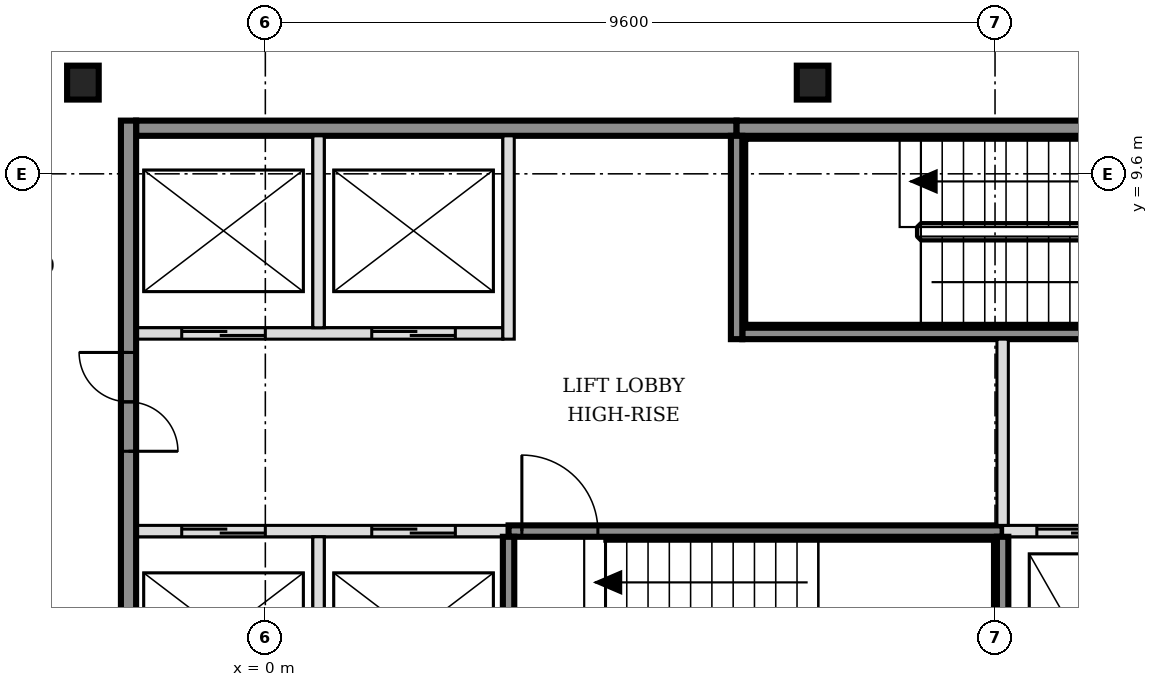
"""IFC4 building model, lengths in metres.
Left out: names, types, materials, properties, quantities, classifications, styles, units other than length and angle.
Written with IfcOpenShell. Run it as: python <this file> out.ifc"""

import sys

from ifc_helpers import new_model, si_unit, direction, frame, frame_2d, origin, origin_2d, place, context, subcontext, project, spatial, rectangle, i_section, extrude, element, fill, save


model = new_model("IFC4")
c1 = context("Model", 3, precision=1e-05, world=origin(), true_north=direction((0.0, 1.0)))
c2 = subcontext(c1, "Body", "Model", "MODEL_VIEW")
j1 = project(units=[si_unit("LENGTHUNIT", "METRE"), si_unit("PLANEANGLEUNIT", "RADIAN")], contexts=[c1])
p1 = place(None, origin())
s1 = spatial("IfcSite", under=j1, at=p1, CompositionType="ELEMENT")
p2 = place(p1, origin())
s2 = spatial("IfcBuilding", under=s1, at=p2, CompositionType="ELEMENT")
p3 = place(p2, frame((0.0, 0.0, 157.8)))
s3 = spatial("IfcBuildingStorey", under=s2, at=p3, CompositionType="ELEMENT", Elevation=157.8)
for number, where, z_axis, x_axis in (
    (1, (-2.4, 10.8, -0.15), (0.0, 0.0, 1.0), (1.0, 0.0, 0.0)),
    (2, (7.2, 10.8, -0.15), (0.0, 0.0, 1.0), (1.0, 0.0, 0.0)),
):
    element("IfcColumn", number, at=place(p3, frame(where, z_axis=z_axis, x_axis=x_axis)), inside=s3, PredefinedType="COLUMN", context=c2, shape_type="SweptSolid", body=[
        extrude(i_section(OverallWidth=0.416, OverallDepth=0.446, WebThickness=0.039, FlangeThickness=0.063, FilletRadius=0.015, at=origin_2d()), origin(), (0.0, 0.0, 1.0), 3.6),
    ])
p4 = place(p3, frame((-1.7, 4.9, 0.0), z_axis=(0.0, 0.0, 1.0), x_axis=(1.0, 0.0, 0.0)))
e3 = element("IfcWall", 3, at=p4, inside=s3, PredefinedType="SOLIDWALL", context=c2, shape_type="SweptSolid", body=[
    extrude(rectangle(XDim=4.9, YDim=0.15, at=frame_2d((2.45, 0.0))), origin(), (0.0, 0.0, 1.0), 3.45),
])
p5 = place(p4, frame((0.6, 0.0, 0.0)))
e4 = element("IfcOpeningElement", 4, at=p5, cuts=e3, PredefinedType="OPENING", context=c2, shape_type="SweptSolid", body=[
    extrude(rectangle(XDim=1.1, YDim=2.1, at=frame_2d((0.55, 1.05))), frame((0.0, 0.085, 0.0), z_axis=(0.0, -1.0, 0.0), x_axis=(1.0, 0.0, 0.0)), (0.0, 0.0, 1.0), 0.17),
])
p6 = place(p4, frame((3.1, 0.0, 0.0)))
e5 = element("IfcOpeningElement", 5, at=p6, cuts=e3, PredefinedType="OPENING", context=c2, shape_type="SweptSolid", body=[
    extrude(rectangle(XDim=1.1, YDim=2.1, at=frame_2d((0.55, 1.05))), frame((0.0, 0.085, 0.0), z_axis=(0.0, -1.0, 0.0), x_axis=(1.0, 0.0, 0.0)), (0.0, 0.0, 1.0), 0.17),
])
p7 = place(p3, frame((3.2, 4.9, 0.0), z_axis=(0.0, 0.0, 1.0), x_axis=(1.0, 0.0, 0.0)))
e6 = element("IfcWall", 6, at=p7, inside=s3, PredefinedType="SOLIDWALL", context=c2, shape_type="SweptSolid", body=[
    extrude(rectangle(XDim=6.5, YDim=0.15, at=frame_2d((3.25, 0.0))), origin(), (0.0, 0.0, 1.0), 3.45),
])
p8 = place(p7, frame((0.175, 0.0, 0.0)))
e7 = element("IfcOpeningElement", 7, at=p8, cuts=e6, PredefinedType="OPENING", context=c2, shape_type="SweptSolid", body=[
    extrude(rectangle(XDim=1.0, YDim=2.1, at=frame_2d((0.5, 1.05))), frame((0.0, 0.085, 0.0), z_axis=(0.0, -1.0, 0.0), x_axis=(1.0, 0.0, 0.0)), (0.0, 0.0, 1.0), 0.17),
])
p9 = place(p3, frame((9.7, 4.9, 0.0), z_axis=(0.0, 0.0, 1.0), x_axis=(1.0, 0.0, 0.0)))
e8 = element("IfcWall", 8, at=p9, inside=s3, PredefinedType="SOLIDWALL", context=c2, shape_type="SweptSolid", body=[
    extrude(rectangle(XDim=6.4, YDim=0.15, at=frame_2d((3.2, 0.0))), origin(), (0.0, 0.0, 1.0), 3.45),
])
p10 = place(p9, frame((0.45, 0.0, 0.0)))
e9 = element("IfcOpeningElement", 9, at=p10, cuts=e8, PredefinedType="OPENING", context=c2, shape_type="SweptSolid", body=[
    extrude(rectangle(XDim=1.0, YDim=2.1, at=frame_2d((0.5, 1.05))), frame((0.0, 0.085, 0.0), z_axis=(0.0, -1.0, 0.0), x_axis=(1.0, 0.0, 0.0)), (0.0, 0.0, 1.0), 0.17),
])
p11 = place(p9, frame((2.35, 0.0, 0.0)))
e10 = element("IfcOpeningElement", 10, at=p11, cuts=e8, PredefinedType="OPENING", context=c2, shape_type="SweptSolid", body=[
    extrude(rectangle(XDim=1.0, YDim=2.1, at=frame_2d((0.5, 1.05))), frame((0.0, 0.085, 0.0), z_axis=(0.0, -1.0, 0.0), x_axis=(1.0, 0.0, 0.0)), (0.0, 0.0, 1.0), 0.17),
])
p12 = place(p9, frame((4.7, 0.0, 0.0)))
e11 = element("IfcOpeningElement", 11, at=p12, cuts=e8, PredefinedType="OPENING", context=c2, shape_type="SweptSolid", body=[
    extrude(rectangle(XDim=0.9, YDim=2.1, at=frame_2d((0.45, 1.05))), frame((0.0, 0.085, 0.0), z_axis=(0.0, -1.0, 0.0), x_axis=(1.0, 0.0, 0.0)), (0.0, 0.0, 1.0), 0.17),
])
p13 = place(p3, frame((-1.7, 7.5, 0.0), z_axis=(0.0, 0.0, 1.0), x_axis=(1.0, 0.0, 0.0)))
e12 = element("IfcWall", 12, at=p13, inside=s3, PredefinedType="SOLIDWALL", context=c2, shape_type="SweptSolid", body=[
    extrude(rectangle(XDim=4.825, YDim=0.15, at=frame_2d((2.413, 0.0))), origin(), (0.0, 0.0, 1.0), 3.45),
])
p14 = place(p13, frame((0.6, 0.0, 0.0)))
e13 = element("IfcOpeningElement", 13, at=p14, cuts=e12, PredefinedType="OPENING", context=c2, shape_type="SweptSolid", body=[
    extrude(rectangle(XDim=1.1, YDim=2.1, at=frame_2d((0.55, 1.05))), frame((0.0, 0.085, 0.0), z_axis=(0.0, -1.0, 0.0), x_axis=(1.0, 0.0, 0.0)), (0.0, 0.0, 1.0), 0.17),
])
p15 = place(p13, frame((3.1, 0.0, 0.0)))
e14 = element("IfcOpeningElement", 14, at=p15, cuts=e12, PredefinedType="OPENING", context=c2, shape_type="SweptSolid", body=[
    extrude(rectangle(XDim=1.1, YDim=2.1, at=frame_2d((0.55, 1.05))), frame((0.0, 0.085, 0.0), z_axis=(0.0, -1.0, 0.0), x_axis=(1.0, 0.0, 0.0)), (0.0, 0.0, 1.0), 0.17),
])
p16 = place(p3, frame((6.275, 7.5, 0.0), z_axis=(0.0, 0.0, 1.0), x_axis=(1.0, 0.0, 0.0)))
e15 = element("IfcWall", 15, at=p16, inside=s3, PredefinedType="SOLIDWALL", context=c2, shape_type="SweptSolid", body=[
    extrude(rectangle(XDim=6.425, YDim=0.15, at=frame_2d((3.212, 0.0))), origin(), (0.0, 0.0, 1.0), 3.45),
])
p17 = place(p16, frame((5.225, 0.0, 0.0)))
e16 = element("IfcOpeningElement", 16, at=p17, cuts=e15, PredefinedType="OPENING", context=c2, shape_type="SweptSolid", body=[
    extrude(rectangle(XDim=1.0, YDim=2.1, at=frame_2d((0.5, 1.05))), frame((0.0, 0.085, 0.0), z_axis=(0.0, -1.0, 0.0), x_axis=(1.0, 0.0, 0.0)), (0.0, 0.0, 1.0), 0.17),
])
p18 = place(p3, frame((-1.7, 10.2, 0.0), z_axis=(0.0, 0.0, 1.0), x_axis=(1.0, 0.0, 0.0)))
e17 = element("IfcWall", 17, at=p18, inside=s3, PredefinedType="SOLIDWALL", context=c2, shape_type="SweptSolid", body=[
    extrude(rectangle(XDim=7.9, YDim=0.2, at=frame_2d((3.95, 0.0))), origin(), (0.0, 0.0, 1.0), 3.45),
])
p19 = place(p3, frame((6.2, 10.2, 0.0), z_axis=(0.0, 0.0, 1.0), x_axis=(1.0, 0.0, 0.0)))
e18 = element("IfcWall", 18, at=p19, inside=s3, PredefinedType="SOLIDWALL", context=c2, shape_type="SweptSolid", body=[
    extrude(rectangle(XDim=6.5, YDim=0.2, at=frame_2d((3.25, 0.0))), origin(), (0.0, 0.0, 1.0), 3.45),
])
p20 = place(p3, frame((-1.8, -5.5, 0.0), z_axis=(0.0, 0.0, 1.0), x_axis=(0.0, 1.0, 0.0)))
e19 = element("IfcWall", 19, at=p20, inside=s3, PredefinedType="SOLIDWALL", context=c2, shape_type="SweptSolid", body=[
    extrude(rectangle(XDim=15.8, YDim=0.2, at=frame_2d((7.9, 0.0))), origin(), (0.0, 0.0, 1.0), 3.45),
])
p21 = place(p20, frame((3.05, 0.0, 0.0)))
e20 = element("IfcOpeningElement", 20, at=p21, cuts=e19, PredefinedType="OPENING", context=c2, shape_type="SweptSolid", body=[
    extrude(rectangle(XDim=1.3, YDim=2.1, at=frame_2d((0.65, 1.05))), frame((0.0, 0.11, 0.0), z_axis=(0.0, -1.0, 0.0), x_axis=(1.0, 0.0, 0.0)), (0.0, 0.0, 1.0), 0.22),
])
p22 = place(p20, frame((11.45, 0.0, 0.0)))
e21 = element("IfcOpeningElement", 21, at=p22, cuts=e19, PredefinedType="OPENING", context=c2, shape_type="SweptSolid", body=[
    extrude(rectangle(XDim=1.3, YDim=2.1, at=frame_2d((0.65, 1.05))), frame((0.0, 0.11, 0.0), z_axis=(0.0, -1.0, 0.0), x_axis=(1.0, 0.0, 0.0)), (0.0, 0.0, 1.0), 0.22),
])
p23 = place(p3, frame((0.7, 2.275, 0.0), z_axis=(0.0, 0.0, 1.0), x_axis=(0.0, 1.0, 0.0)))
e22 = element("IfcWall", 22, at=p23, inside=s3, PredefinedType="SOLIDWALL", context=c2, shape_type="SweptSolid", body=[
    extrude(rectangle(XDim=2.55, YDim=0.15, at=frame_2d((1.275, 0.0))), origin(), (0.0, 0.0, 1.0), 3.45),
])
p24 = place(p3, frame((0.7, 7.575, 0.0), z_axis=(0.0, 0.0, 1.0), x_axis=(0.0, 1.0, 0.0)))
e23 = element("IfcWall", 23, at=p24, inside=s3, PredefinedType="SOLIDWALL", context=c2, shape_type="SweptSolid", body=[
    extrude(rectangle(XDim=2.525, YDim=0.15, at=frame_2d((1.263, 0.0))), origin(), (0.0, 0.0, 1.0), 3.45),
])
p25 = place(p3, frame((3.2, 2.275, 0.0), z_axis=(0.0, 0.0, 1.0), x_axis=(0.0, 1.0, 0.0)))
e24 = element("IfcWall", 24, at=p25, inside=s3, PredefinedType="SOLIDWALL", context=c2, shape_type="SweptSolid", body=[
    extrude(rectangle(XDim=2.55, YDim=0.15, at=frame_2d((1.275, 0.0))), origin(), (0.0, 0.0, 1.0), 3.45),
])
for number, where, z_axis, x_axis in (
    (25, (3.2, 7.425, 0.0), (0.0, 0.0, 1.0), (0.0, 1.0, 0.0)),
    (26, (6.2, 7.425, 0.0), (0.0, 0.0, 1.0), (0.0, 1.0, 0.0)),
):
    element("IfcWall", number, at=place(p3, frame(where, z_axis=z_axis, x_axis=x_axis)), inside=s3, PredefinedType="SOLIDWALL", context=c2, shape_type="SweptSolid", body=[
        extrude(rectangle(XDim=2.675, YDim=0.15, at=frame_2d((1.337, 0.0))), origin(), (0.0, 0.0, 1.0), 3.45),
    ])
p26 = place(p3, frame((9.7, 2.275, 0.0), z_axis=(0.0, 0.0, 1.0), x_axis=(0.0, 1.0, 0.0)))
e27 = element("IfcWall", 27, at=p26, inside=s3, PredefinedType="SOLIDWALL", context=c2, shape_type="SweptSolid", body=[
    extrude(rectangle(XDim=2.55, YDim=0.15, at=frame_2d((1.275, 0.0))), origin(), (0.0, 0.0, 1.0), 3.45),
])
p27 = place(p3, frame((9.7, 4.975, 0.0), z_axis=(0.0, 0.0, 1.0), x_axis=(0.0, 1.0, 0.0)))
e28 = element("IfcWall", 28, at=p27, inside=s3, PredefinedType="SOLIDWALL", context=c2, shape_type="SweptSolid", body=[
    extrude(rectangle(XDim=2.45, YDim=0.15, at=frame_2d((1.225, 0.0))), origin(), (0.0, 0.0, 1.0), 3.45),
])
p28 = place(p5, origin())
e29 = element("IfcDoor", 29, at=p28, inside=s3, OperationType="DOUBLE_DOOR_SLIDING", PredefinedType="DOOR", context=c2, shape_type="SweptSolid", body=[
    extrude(rectangle(XDim=1.1, YDim=2.1, at=frame_2d((0.55, 1.05))), frame((0.0, 0.025, 0.0), z_axis=(0.0, -1.0, 0.0), x_axis=(1.0, 0.0, 0.0)), (0.0, 0.0, 1.0), 0.05),
])
fill(e4, e29)
p29 = place(p6, origin())
e30 = element("IfcDoor", 30, at=p29, inside=s3, OperationType="DOUBLE_DOOR_SLIDING", PredefinedType="DOOR", context=c2, shape_type="SweptSolid", body=[
    extrude(rectangle(XDim=1.1, YDim=2.1, at=frame_2d((0.55, 1.05))), frame((0.0, 0.025, 0.0), z_axis=(0.0, -1.0, 0.0), x_axis=(1.0, 0.0, 0.0)), (0.0, 0.0, 1.0), 0.05),
])
fill(e5, e30)
p30 = place(p14, origin())
e31 = element("IfcDoor", 31, at=p30, inside=s3, OperationType="DOUBLE_DOOR_SLIDING", PredefinedType="DOOR", context=c2, shape_type="SweptSolid", body=[
    extrude(rectangle(XDim=1.1, YDim=2.1, at=frame_2d((0.55, 1.05))), frame((0.0, 0.025, 0.0), z_axis=(0.0, -1.0, 0.0), x_axis=(1.0, 0.0, 0.0)), (0.0, 0.0, 1.0), 0.05),
])
fill(e13, e31)
p31 = place(p15, origin())
e32 = element("IfcDoor", 32, at=p31, inside=s3, OperationType="DOUBLE_DOOR_SLIDING", PredefinedType="DOOR", context=c2, shape_type="SweptSolid", body=[
    extrude(rectangle(XDim=1.1, YDim=2.1, at=frame_2d((0.55, 1.05))), frame((0.0, 0.025, 0.0), z_axis=(0.0, -1.0, 0.0), x_axis=(1.0, 0.0, 0.0)), (0.0, 0.0, 1.0), 0.05),
])
fill(e14, e32)
p32 = place(p10, origin())
e33 = element("IfcDoor", 33, at=p32, inside=s3, OperationType="DOUBLE_DOOR_SLIDING", PredefinedType="DOOR", context=c2, shape_type="SweptSolid", body=[
    extrude(rectangle(XDim=1.0, YDim=2.1, at=frame_2d((0.5, 1.05))), frame((0.0, 0.025, 0.0), z_axis=(0.0, -1.0, 0.0), x_axis=(1.0, 0.0, 0.0)), (0.0, 0.0, 1.0), 0.05),
])
fill(e9, e33)
p33 = place(p8, origin())
e34 = element("IfcDoor", 34, at=p33, inside=s3, OperationType="SINGLE_SWING_LEFT", PredefinedType="DOOR", context=c2, shape_type="SweptSolid", body=[
    extrude(rectangle(XDim=1.0, YDim=2.1, at=frame_2d((0.5, 1.05))), frame((0.0, 0.025, 0.0), z_axis=(0.0, -1.0, 0.0), x_axis=(1.0, 0.0, 0.0)), (0.0, 0.0, 1.0), 0.05),
])
fill(e7, e34)
p34 = place(p22, origin())
e35 = element("IfcDoor", 35, at=p34, inside=s3, OperationType="DOUBLE_DOOR_SINGLE_SWING", PredefinedType="DOOR", context=c2, shape_type="SweptSolid", body=[
    extrude(rectangle(XDim=1.3, YDim=2.1, at=frame_2d((0.65, 1.05))), frame((0.0, 0.025, 0.0), z_axis=(0.0, -1.0, 0.0), x_axis=(1.0, 0.0, 0.0)), (0.0, 0.0, 1.0), 0.05),
])
fill(e21, e35)
save(model, sys.argv[1])
